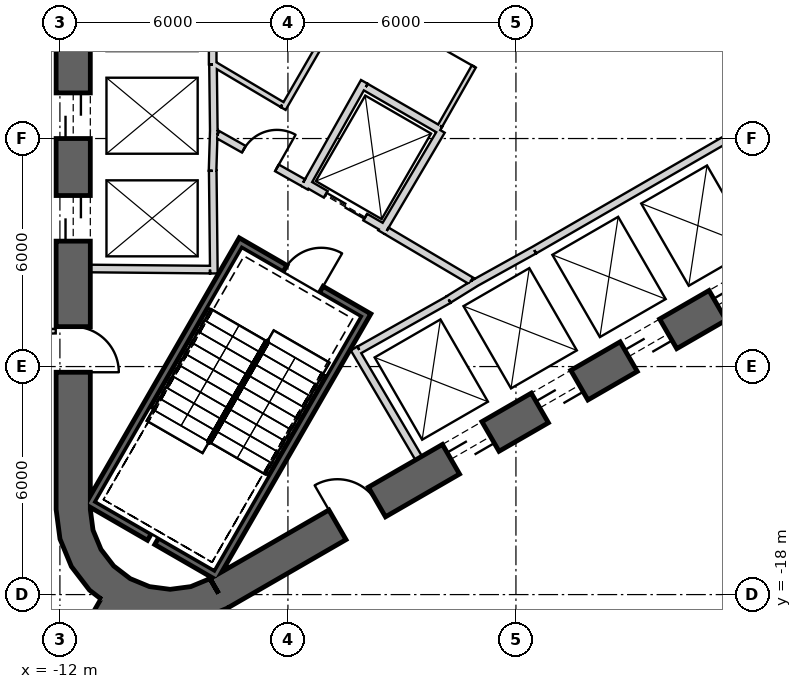
"""IFC4 building model, lengths in metres.
Left out: names, types, materials, properties, quantities, classifications, styles, units other than length and angle.
Written with IfcOpenShell. Run it as: python <this file> out.ifc"""

import sys

from ifc_helpers import new_model, si_unit, direction, frame, frame_2d, origin, place, context, subcontext, project, spatial, polyline, rectangle, outline, extrude, element, fill, save


model = new_model("IFC4")
c1 = context("Model", 3, precision=1e-05, world=origin(), true_north=direction((0.0, 1.0)))
c2 = subcontext(c1, "Body", "Model", "MODEL_VIEW")
j1 = project(units=[si_unit("LENGTHUNIT", "METRE"), si_unit("PLANEANGLEUNIT", "RADIAN")], contexts=[c1])
p1 = place(None, origin())
s1 = spatial("IfcSite", under=j1, at=p1, CompositionType="ELEMENT")
p2 = place(p1, origin())
s2 = spatial("IfcBuilding", under=s1, at=p2, CompositionType="ELEMENT")
p3 = place(p2, frame((0.0, 0.0, 156.2)))
s3 = spatial("IfcBuildingStorey", under=s2, at=p3, CompositionType="ELEMENT", Elevation=156.2)
p4 = place(p3, frame((-11.65, 15.762, 0.0), z_axis=(0.0, 0.0, 1.0), x_axis=(0.0, -1.0, 0.0)))
e1 = element("IfcWall", 1, at=p4, inside=s3, PredefinedType="SHEAR", context=c2, shape_type="SweptSolid", body=[
    extrude(rectangle(XDim=31.523, YDim=0.9, at=frame_2d((15.762, 0.0))), origin(), (0.0, 0.0, 1.0), 7.0),
])
p5 = place(p4, frame((7.062, 0.0, 0.0)))
e2 = element("IfcOpeningElement", 2, at=p5, cuts=e1, PredefinedType="OPENING", context=c2, shape_type="SweptSolid", body=[
    extrude(rectangle(XDim=1.2, YDim=2.4, at=frame_2d((0.6, 1.2))), frame((0.0, 0.46, 0.0), z_axis=(0.0, -1.0, 0.0), x_axis=(1.0, 0.0, 0.0)), (0.0, 0.0, 1.0), 0.92),
])
p6 = place(p4, frame((9.762, 0.0, 0.0)))
e3 = element("IfcOpeningElement", 3, at=p6, cuts=e1, PredefinedType="OPENING", context=c2, shape_type="SweptSolid", body=[
    extrude(rectangle(XDim=1.2, YDim=2.4, at=frame_2d((0.6, 1.2))), frame((0.0, 0.46, 0.0), z_axis=(0.0, -1.0, 0.0), x_axis=(1.0, 0.0, 0.0)), (0.0, 0.0, 1.0), 0.92),
])
p7 = place(p4, frame((12.462, 0.0, 0.0)))
e4 = element("IfcOpeningElement", 4, at=p7, cuts=e1, PredefinedType="OPENING", context=c2, shape_type="SweptSolid", body=[
    extrude(rectangle(XDim=1.2, YDim=2.4, at=frame_2d((0.6, 1.2))), frame((0.0, 0.46, 0.0), z_axis=(0.0, -1.0, 0.0), x_axis=(1.0, 0.0, 0.0)), (0.0, 0.0, 1.0), 0.92),
])
p8 = place(p4, frame((15.162, 0.0, 0.0)))
e5 = element("IfcOpeningElement", 5, at=p8, cuts=e1, PredefinedType="OPENING", context=c2, shape_type="SweptSolid", body=[
    extrude(rectangle(XDim=1.2, YDim=2.4, at=frame_2d((0.6, 1.2))), frame((0.0, 0.46, 0.0), z_axis=(0.0, -1.0, 0.0), x_axis=(1.0, 0.0, 0.0)), (0.0, 0.0, 1.0), 0.92),
])
p9 = place(p4, frame((17.862, 0.0, 0.0)))
e6 = element("IfcOpeningElement", 6, at=p9, cuts=e1, PredefinedType="OPENING", context=c2, shape_type="SweptSolid", body=[
    extrude(rectangle(XDim=1.2, YDim=2.4, at=frame_2d((0.6, 1.2))), frame((0.0, 0.46, 0.0), z_axis=(0.0, -1.0, 0.0), x_axis=(1.0, 0.0, 0.0)), (0.0, 0.0, 1.0), 0.92),
])
p10 = place(p4, frame((20.562, 0.0, 0.0)))
e7 = element("IfcOpeningElement", 7, at=p10, cuts=e1, PredefinedType="OPENING", context=c2, shape_type="SweptSolid", body=[
    extrude(rectangle(XDim=1.2, YDim=2.4, at=frame_2d((0.6, 1.2))), frame((0.0, 0.46, 0.0), z_axis=(0.0, -1.0, 0.0), x_axis=(1.0, 0.0, 0.0)), (0.0, 0.0, 1.0), 0.92),
])
p11 = place(p4, frame((23.262, 0.0, 0.0)))
e8 = element("IfcOpeningElement", 8, at=p11, cuts=e1, PredefinedType="OPENING", context=c2, shape_type="SweptSolid", body=[
    extrude(rectangle(XDim=1.2, YDim=2.4, at=frame_2d((0.6, 1.2))), frame((0.0, 0.46, 0.0), z_axis=(0.0, -1.0, 0.0), x_axis=(1.0, 0.0, 0.0)), (0.0, 0.0, 1.0), 0.92),
])
p12 = place(p4, frame((3.612, 0.0, 0.0)))
e9 = element("IfcOpeningElement", 9, at=p12, cuts=e1, PredefinedType="OPENING", context=c2, shape_type="SweptSolid", body=[
    extrude(rectangle(XDim=1.2, YDim=2.4, at=frame_2d((0.6, 1.2))), frame((0.0, 0.46, 0.0), z_axis=(0.0, -1.0, 0.0), x_axis=(1.0, 0.0, 0.0)), (0.0, 0.0, 1.0), 0.92),
])
p13 = place(p4, frame((26.712, 0.0, 0.0)))
e10 = element("IfcOpeningElement", 10, at=p13, cuts=e1, PredefinedType="OPENING", context=c2, shape_type="SweptSolid", body=[
    extrude(rectangle(XDim=1.2, YDim=2.4, at=frame_2d((0.6, 1.2))), frame((0.0, 0.46, 0.0), z_axis=(0.0, -1.0, 0.0), x_axis=(1.0, 0.0, 0.0)), (0.0, 0.0, 1.0), 0.92),
])
p14 = place(p3, frame((-7.825, -17.97, 0.0), z_axis=(0.0, 0.0, 1.0), x_axis=(0.866028369851, 0.499994862586, 0.0)))
e11 = element("IfcWall", 11, at=p14, inside=s3, PredefinedType="SHEAR", context=c2, shape_type="SweptSolid", body=[
    extrude(rectangle(XDim=31.523, YDim=0.9, at=frame_2d((15.762, 0.0))), origin(), (0.0, 0.0, 1.0), 7.0),
])
p15 = place(p14, frame((7.062, 0.0, 0.0)))
e12 = element("IfcOpeningElement", 12, at=p15, cuts=e11, PredefinedType="OPENING", context=c2, shape_type="SweptSolid", body=[
    extrude(rectangle(XDim=1.2, YDim=2.4, at=frame_2d((0.6, 1.2))), frame((0.0, 0.46, 0.0), z_axis=(0.0, -1.0, 0.0), x_axis=(1.0, 0.0, 0.0)), (0.0, 0.0, 1.0), 0.92),
])
p16 = place(p14, frame((9.762, 0.0, 0.0)))
e13 = element("IfcOpeningElement", 13, at=p16, cuts=e11, PredefinedType="OPENING", context=c2, shape_type="SweptSolid", body=[
    extrude(rectangle(XDim=1.2, YDim=2.4, at=frame_2d((0.6, 1.2))), frame((0.0, 0.46, 0.0), z_axis=(0.0, -1.0, 0.0), x_axis=(1.0, 0.0, 0.0)), (0.0, 0.0, 1.0), 0.92),
])
p17 = place(p14, frame((12.462, 0.0, 0.0)))
e14 = element("IfcOpeningElement", 14, at=p17, cuts=e11, PredefinedType="OPENING", context=c2, shape_type="SweptSolid", body=[
    extrude(rectangle(XDim=1.2, YDim=2.4, at=frame_2d((0.6, 1.2))), frame((0.0, 0.46, 0.0), z_axis=(0.0, -1.0, 0.0), x_axis=(1.0, 0.0, 0.0)), (0.0, 0.0, 1.0), 0.92),
])
p18 = place(p14, frame((15.162, 0.0, 0.0)))
e15 = element("IfcOpeningElement", 15, at=p18, cuts=e11, PredefinedType="OPENING", context=c2, shape_type="SweptSolid", body=[
    extrude(rectangle(XDim=1.2, YDim=2.4, at=frame_2d((0.6, 1.2))), frame((0.0, 0.46, 0.0), z_axis=(0.0, -1.0, 0.0), x_axis=(1.0, 0.0, 0.0)), (0.0, 0.0, 1.0), 0.92),
])
p19 = place(p14, frame((17.862, 0.0, 0.0)))
e16 = element("IfcOpeningElement", 16, at=p19, cuts=e11, PredefinedType="OPENING", context=c2, shape_type="SweptSolid", body=[
    extrude(rectangle(XDim=1.2, YDim=2.4, at=frame_2d((0.6, 1.2))), frame((0.0, 0.46, 0.0), z_axis=(0.0, -1.0, 0.0), x_axis=(1.0, 0.0, 0.0)), (0.0, 0.0, 1.0), 0.92),
])
p20 = place(p14, frame((20.562, 0.0, 0.0)))
e17 = element("IfcOpeningElement", 17, at=p20, cuts=e11, PredefinedType="OPENING", context=c2, shape_type="SweptSolid", body=[
    extrude(rectangle(XDim=1.2, YDim=2.4, at=frame_2d((0.6, 1.2))), frame((0.0, 0.46, 0.0), z_axis=(0.0, -1.0, 0.0), x_axis=(1.0, 0.0, 0.0)), (0.0, 0.0, 1.0), 0.92),
])
p21 = place(p14, frame((26.712, 0.0, 0.0)))
e18 = element("IfcOpeningElement", 18, at=p21, cuts=e11, PredefinedType="OPENING", context=c2, shape_type="SweptSolid", body=[
    extrude(rectangle(XDim=1.2, YDim=2.4, at=frame_2d((0.6, 1.2))), frame((0.0, 0.46, 0.0), z_axis=(0.0, -1.0, 0.0), x_axis=(1.0, 0.0, 0.0)), (0.0, 0.0, 1.0), 0.92),
])
p22 = place(p14, frame((3.612, 0.0, 0.0)))
e19 = element("IfcOpeningElement", 19, at=p22, cuts=e11, PredefinedType="OPENING", context=c2, shape_type="SweptSolid", body=[
    extrude(rectangle(XDim=1.2, YDim=2.4, at=frame_2d((0.6, 1.2))), frame((0.0, 0.46, 0.0), z_axis=(0.0, -1.0, 0.0), x_axis=(1.0, 0.0, 0.0)), (0.0, 0.0, 1.0), 0.92),
])
p23 = place(p3, origin())
e20 = element("IfcWall", 20, at=p23, inside=s3, PredefinedType="SHEAR", context=c2, shape_type="SweptSolid", body=[
    extrude(outline(polyline([(-12.1, -15.762), (-11.998, -16.538), (-11.698, -17.262), (-11.221, -17.883), (-10.6, -18.36), (-9.876, -18.659), (-9.1, -18.762), (-8.323, -18.659), (-7.6, -18.36), (-8.05, -17.58), (-8.556, -17.79), (-9.1, -17.862), (-9.644, -17.79), (-10.15, -17.58), (-10.585, -17.247), (-10.919, -16.812), (-11.128, -16.305), (-11.2, -15.762), (-12.1, -15.762)])), origin(), (0.0, 0.0, 1.0), 7.0),
])
p24 = place(p3, frame((-10.575, -18.316, 0.0), z_axis=(0.0, 0.0, 1.0), x_axis=(-0.500002326941, -0.86602406032, 0.0)))
e21 = element("IfcWall", 21, at=p24, inside=s3, PredefinedType="SHEAR", context=c2, shape_type="SweptSolid", body=[
    extrude(rectangle(XDim=12.384, YDim=0.8, at=frame_2d((6.192, 0.0))), origin(), (0.0, 0.0, 1.0), 7.0),
])
p25 = place(p24, frame((2.05, 0.0, 0.0)))
e22 = element("IfcOpeningElement", 22, at=p25, cuts=e21, PredefinedType="OPENING", context=c2, shape_type="SweptSolid", body=[
    extrude(rectangle(XDim=1.4, YDim=2.4, at=frame_2d((0.7, 1.2))), frame((0.0, 0.41, 0.0), z_axis=(0.0, -1.0, 0.0), x_axis=(1.0, 0.0, 0.0)), (0.0, 0.0, 1.0), 0.82),
])
p26 = place(p3, frame((-7.98, 4.05, 0.0), z_axis=(0.0, 0.0, 1.0), x_axis=(0.0, -1.0, 0.0)))
e23 = element("IfcWall", 23, at=p26, inside=s3, PredefinedType="PLUMBINGWALL", context=c2, shape_type="SweptSolid", body=[
    extrude(rectangle(XDim=8.1, YDim=0.2, at=frame_2d((4.05, 0.0))), origin(), (0.0, 0.0, 1.0), 6.65),
])
p27 = place(p3, frame((-7.95, -5.772, 0.0), z_axis=(0.0, 0.0, 1.0), x_axis=(-0.030803413295, -0.999525462272, 0.0)))
e24 = element("IfcWall", 24, at=p27, inside=s3, PredefinedType="PLUMBINGWALL", context=c2, shape_type="SweptSolid", body=[
    extrude(rectangle(XDim=1.078, YDim=0.2, at=frame_2d((0.539, 0.0))), origin(), (0.0, 0.0, 1.0), 6.65),
])
p28 = place(p3, frame((-7.971, -4.05, 0.0), z_axis=(0.0, 0.0, 1.0), x_axis=(0.012042535896, -0.999927486035, 0.0)))
e25 = element("IfcWall", 25, at=p28, inside=s3, PredefinedType="PLUMBINGWALL", context=c2, shape_type="SweptSolid", body=[
    extrude(rectangle(XDim=1.845, YDim=0.2, at=frame_2d((0.922, 0.0))), origin(), (0.0, 0.0, 1.0), 6.65),
])
p29 = place(p3, frame((-7.979, -6.85, 0.0), z_axis=(0.0, 0.0, 1.0), x_axis=(0.011121475088, -0.999938154483, 0.0)))
e26 = element("IfcWall", 26, at=p29, inside=s3, PredefinedType="PLUMBINGWALL", context=c2, shape_type="SweptSolid", body=[
    extrude(rectangle(XDim=2.7, YDim=0.2, at=frame_2d((1.35, 0.0))), origin(), (0.0, 0.0, 1.0), 6.65),
])
p30 = place(p3, frame((-8.05, -9.449, 0.0), z_axis=(0.0, 0.0, 1.0), x_axis=(-0.999957467379, 0.009222983926, 0.0)))
e27 = element("IfcWall", 27, at=p30, inside=s3, PredefinedType="PLUMBINGWALL", context=c2, shape_type="SweptSolid", body=[
    extrude(rectangle(XDim=3.15, YDim=0.2, at=frame_2d((1.575, 0.0))), origin(), (0.0, 0.0, 1.0), 6.65),
])
p31 = place(p3, frame((0.483, -8.936, 0.0), z_axis=(0.0, 0.0, 1.0), x_axis=(0.866030989016, 0.499990325971, 0.0)))
e28 = element("IfcWall", 28, at=p31, inside=s3, PredefinedType="PLUMBINGWALL", context=c2, shape_type="SweptSolid", body=[
    extrude(rectangle(XDim=8.1, YDim=0.2, at=frame_2d((4.05, 0.0))), origin(), (0.0, 0.0, 1.0), 6.65),
])
p32 = place(p3, frame((-2.558, -14.409, 0.0), z_axis=(0.0, 0.0, 1.0), x_axis=(-0.507997497166, 0.861358544901, 0.0)))
e29 = element("IfcWall", 29, at=p32, inside=s3, PredefinedType="PLUMBINGWALL", context=c2, shape_type="SweptSolid", body=[
    extrude(rectangle(XDim=3.35, YDim=0.2, at=frame_2d((1.675, 0.0))), origin(), (0.0, 0.0, 1.0), 6.65),
])
p33 = place(p3, frame((-1.769, -10.237, 0.0), z_axis=(0.0, 0.0, 1.0), x_axis=(-0.871534483978, -0.490334215854, 0.0)))
e30 = element("IfcWall", 30, at=p33, inside=s3, PredefinedType="PLUMBINGWALL", context=c2, shape_type="SweptSolid", body=[
    extrude(rectangle(XDim=2.7, YDim=0.2, at=frame_2d((1.35, 0.0))), origin(), (0.0, 0.0, 1.0), 6.65),
])
p34 = place(p3, frame((-1.024, -9.771, 0.0), z_axis=(0.0, 0.0, 1.0), x_axis=(-0.850348075135, -0.526220629693, 0.0)))
e31 = element("IfcWall", 31, at=p34, inside=s3, PredefinedType="PLUMBINGWALL", context=c2, shape_type="SweptSolid", body=[
    extrude(rectangle(XDim=0.878, YDim=0.2, at=frame_2d((0.439, 0.0))), origin(), (0.0, 0.0, 1.0), 6.65),
])
p35 = place(p3, frame((-1.13, -9.831, 0.0), z_axis=(0.0, 0.0, 1.0), x_axis=(0.874269620932, 0.485440655401, 0.0)))
e32 = element("IfcWall", 32, at=p35, inside=s3, PredefinedType="PLUMBINGWALL", context=c2, shape_type="SweptSolid", body=[
    extrude(rectangle(XDim=1.845, YDim=0.2, at=frame_2d((0.922, 0.0))), origin(), (0.0, 0.0, 1.0), 6.65),
])
p36 = place(p3, frame((-3.905, -10.563, -0.35), z_axis=(0.0, 0.0, 1.0), x_axis=(-0.500012932018, -0.866017937352, 0.0)))
e33 = element("IfcWall", 33, at=p36, inside=s3, PredefinedType="SHEAR", context=c2, shape_type="SweptSolid", body=[
    extrude(rectangle(XDim=8.1, YDim=0.2, at=frame_2d((4.05, 0.0))), origin(), (0.0, 0.0, 1.0), 7.0),
])
p37 = place(p3, frame((-11.282, -15.541, -0.35), z_axis=(0.0, 0.0, 1.0), x_axis=(0.866000578957, -0.500042995397, 0.0)))
e34 = element("IfcWall", 34, at=p37, inside=s3, PredefinedType="SHEAR", context=c2, shape_type="SweptSolid", body=[
    extrude(rectangle(XDim=1.89, YDim=0.2, at=frame_2d((0.945, 0.0))), origin(), (0.0, 0.0, 1.0), 7.0),
])
p38 = place(p3, frame((-9.455, -16.596, -0.35), z_axis=(0.0, 0.0, 1.0), x_axis=(0.866038843867, -0.499976720371, 0.0)))
e35 = element("IfcWall", 35, at=p38, inside=s3, PredefinedType="SHEAR", context=c2, shape_type="SweptSolid", body=[
    extrude(rectangle(XDim=1.69, YDim=0.2, at=frame_2d((0.845, 0.0))), origin(), (0.0, 0.0, 1.0), 7.0),
])
p39 = place(p3, frame((-7.196, -8.663, -0.35), z_axis=(0.0, 0.0, 1.0), x_axis=(-0.499997992926, -0.866026562566, 0.0)))
e36 = element("IfcWall", 36, at=p39, inside=s3, PredefinedType="SHEAR", context=c2, shape_type="SweptSolid", body=[
    extrude(rectangle(XDim=7.9, YDim=0.2, at=frame_2d((3.95, 0.0))), origin(), (0.0, 0.0, 1.0), 7.0),
])
p40 = place(p3, frame((-4.041, -10.599, -0.35), z_axis=(0.0, 0.0, 1.0), x_axis=(-0.866047807691, 0.499961193289, 0.0)))
e37 = element("IfcWall", 37, at=p40, inside=s3, PredefinedType="SHEAR", context=c2, shape_type="SweptSolid", body=[
    extrude(rectangle(XDim=3.6, YDim=0.2, at=frame_2d((1.8, 0.0))), origin(), (0.0, 0.0, 1.0), 7.0),
])
p41 = place(p40, frame((1.25, 0.0, 0.35)))
e38 = element("IfcOpeningElement", 38, at=p41, cuts=e37, PredefinedType="OPENING", context=c2, shape_type="SweptSolid", body=[
    extrude(rectangle(XDim=1.1, YDim=2.1, at=frame_2d((0.55, 1.05))), frame((0.0, 0.11, 0.0), z_axis=(0.0, -1.0, 0.0), x_axis=(1.0, 0.0, 0.0)), (0.0, 0.0, 1.0), 0.22),
])
p42 = place(p3, frame((-3.446, -8.368, 0.0), z_axis=(0.0, 0.0, 1.0), x_axis=(-0.866024647952, 0.500001309137, 0.0)))
e39 = element("IfcWall", 39, at=p42, inside=s3, PredefinedType="PLUMBINGWALL", context=c2, shape_type="SweptSolid", body=[
    extrude(rectangle(XDim=2.4, YDim=0.2, at=frame_2d((1.2, 0.0))), origin(), (0.0, 0.0, 1.0), 6.65),
])
p43 = place(p42, frame((0.6, 0.0, 0.0)))
e40 = element("IfcOpeningElement", 40, at=p43, cuts=e39, PredefinedType="OPENING", context=c2, shape_type="SweptSolid", body=[
    extrude(rectangle(XDim=1.2, YDim=2.4, at=frame_2d((0.6, 1.2))), frame((0.0, 0.11, 0.0), z_axis=(0.0, -1.0, 0.0), x_axis=(1.0, 0.0, 0.0)), (0.0, 0.0, 1.0), 0.22),
])
p44 = place(p3, frame((-1.961, -5.796, 0.0), z_axis=(0.0, 0.0, 1.0), x_axis=(-0.508647062354, -0.860975125052, 0.0)))
e41 = element("IfcWall", 41, at=p44, inside=s3, PredefinedType="PLUMBINGWALL", context=c2, shape_type="SweptSolid", body=[
    extrude(rectangle(XDim=3.1, YDim=0.2, at=frame_2d((1.55, 0.0))), origin(), (0.0, 0.0, 1.0), 6.65),
])
p45 = place(p3, frame((-3.99, -4.509, 0.0), z_axis=(0.0, 0.0, 1.0), x_axis=(-0.491358283181, -0.870957540612, 0.0)))
e42 = element("IfcWall", 42, at=p45, inside=s3, PredefinedType="PLUMBINGWALL", context=c2, shape_type="SweptSolid", body=[
    extrude(rectangle(XDim=3.2, YDim=0.2, at=frame_2d((1.6, 0.0))), origin(), (0.0, 0.0, 1.0), 6.65),
])
p46 = place(p3, frame((-3.953, -4.646, 0.0), z_axis=(0.0, 0.0, 1.0), x_axis=(0.866065302921, -0.4999308863, 0.0)))
e43 = element("IfcWall", 43, at=p46, inside=s3, PredefinedType="PLUMBINGWALL", context=c2, shape_type="SweptSolid", body=[
    extrude(rectangle(XDim=2.264, YDim=0.2, at=frame_2d((1.132, 0.0))), origin(), (0.0, 0.0, 1.0), 6.65),
])
p47 = place(p3, frame((-3.401, -8.43, 0.0), z_axis=(0.0, 0.0, 1.0), x_axis=(0.860615607571, -0.509255118781, 0.0)))
e44 = element("IfcWall", 44, at=p47, inside=s3, PredefinedType="PARTITIONING", context=c2, shape_type="SweptSolid", body=[
    extrude(rectangle(XDim=2.581, YDim=0.2, at=frame_2d((1.29, 0.0))), origin(), (0.0, 0.0, 1.0), 6.65),
])
p48 = place(p3, frame((-7.849, -5.894, 0.0), z_axis=(0.0, 0.0, 1.0), x_axis=(0.871363259478, -0.490638431059, 0.0)))
e45 = element("IfcWall", 45, at=p48, inside=s3, PredefinedType="PARTITIONING", context=c2, shape_type="SweptSolid", body=[
    extrude(rectangle(XDim=2.581, YDim=0.2, at=frame_2d((1.291, 0.0))), origin(), (0.0, 0.0, 1.0), 6.65),
])
p49 = place(p48, frame((0.791, 0.0, 0.0)))
e46 = element("IfcOpeningElement", 46, at=p49, cuts=e45, PredefinedType="OPENING", context=c2, shape_type="SweptSolid", body=[
    extrude(rectangle(XDim=1.0, YDim=2.1, at=frame_2d((0.5, 1.05))), frame((0.0, 0.11, 0.0), z_axis=(0.0, -1.0, 0.0), x_axis=(1.0, 0.0, 0.0)), (0.0, 0.0, 1.0), 0.22),
])
p50 = place(p3, frame((0.224, -1.761, 0.0), z_axis=(0.0, 0.0, 1.0), x_axis=(-0.494327216836, -0.869275907118, 0.0)))
e47 = element("IfcWall", 47, at=p50, inside=s3, PredefinedType="PARTITIONING", context=c2, shape_type="SweptSolid", body=[
    extrude(rectangle(XDim=4.487, YDim=0.12, at=frame_2d((2.244, 0.0))), origin(), (0.0, 0.0, 1.0), 6.65),
])
p51 = place(p50, frame((1.895, 0.0, 0.0)))
e48 = element("IfcOpeningElement", 48, at=p51, cuts=e47, PredefinedType="OPENING", context=c2, shape_type="SweptSolid", body=[
    extrude(rectangle(XDim=0.8, YDim=2.1, at=frame_2d((0.4, 1.05))), frame((0.0, 0.07, 0.0), z_axis=(0.0, -1.0, 0.0), x_axis=(1.0, 0.0, 0.0)), (0.0, 0.0, 1.0), 0.14),
])
p52 = place(p3, frame((-6.126, -5.21, 0.0), z_axis=(0.0, 0.0, 1.0), x_axis=(0.499990139034, 0.866031096941, 0.0)))
e49 = element("IfcWall", 49, at=p52, inside=s3, PredefinedType="PLUMBINGWALL", context=c2, shape_type="SweptSolid", body=[
    extrude(rectangle(XDim=3.0, YDim=0.15, at=frame_2d((1.5, 0.0))), origin(), (0.0, 0.0, 1.0), 6.65),
])
p53 = place(p3, frame((-7.95, -4.041, 0.0), z_axis=(0.0, 0.0, 1.0), x_axis=(0.860090281069, -0.510141851263, 0.0)))
e50 = element("IfcWall", 50, at=p53, inside=s3, PredefinedType="PLUMBINGWALL", context=c2, shape_type="SweptSolid", body=[
    extrude(rectangle(XDim=2.089, YDim=0.15, at=frame_2d((1.045, 0.0))), origin(), (0.0, 0.0, 1.0), 6.65),
])
p54 = place(p3, frame((-18.156, -11.254, 0.0), z_axis=(0.0, 0.0, 1.0), x_axis=(0.999523488274, 0.030867400097, 0.0)))
e51 = element("IfcWall", 51, at=p54, inside=s3, PredefinedType="PARTITIONING", context=c2, shape_type="SweptSolid", body=[
    extrude(rectangle(XDim=6.059, YDim=0.12, at=frame_2d((3.029, 0.0))), origin(), (0.0, 0.0, 1.0), 5.93),
])
p55 = place(p54, frame((2.63, 0.0, 0.0)))
e52 = element("IfcOpeningElement", 52, at=p55, cuts=e51, PredefinedType="OPENING", context=c2, shape_type="SweptSolid", body=[
    extrude(rectangle(XDim=0.9, YDim=2.1, at=frame_2d((0.45, 1.05))), frame((0.0, 0.07, 0.0), z_axis=(0.0, -1.0, 0.0), x_axis=(1.0, 0.0, 0.0)), (0.0, 0.0, 1.0), 0.14),
])
p56 = place(p41, origin())
e53 = element("IfcDoor", 53, at=p56, inside=s3, OperationType="SINGLE_SWING_LEFT", PredefinedType="USERDEFINED", context=c2, shape_type="SweptSolid", body=[
    extrude(rectangle(XDim=1.1, YDim=2.1, at=frame_2d((0.55, 1.05))), frame((0.0, 0.025, 0.0), z_axis=(0.0, -1.0, 0.0), x_axis=(1.0, 0.0, 0.0)), (0.0, 0.0, 1.0), 0.05),
])
fill(e38, e53)
p57 = place(p49, origin())
e54 = element("IfcDoor", 54, at=p57, inside=s3, OperationType="SINGLE_SWING_RIGHT", PredefinedType="USERDEFINED", context=c2, shape_type="SweptSolid", body=[
    extrude(rectangle(XDim=1.0, YDim=2.1, at=frame_2d((0.5, 1.05))), frame((0.0, 0.025, 0.0), z_axis=(0.0, -1.0, 0.0), x_axis=(1.0, 0.0, 0.0)), (0.0, 0.0, 1.0), 0.05),
])
fill(e46, e54)
p58 = place(p43, origin())
e55 = element("IfcDoor", 55, at=p58, inside=s3, OperationType="SLIDING_TO_LEFT", PredefinedType="USERDEFINED", context=c2, shape_type="SweptSolid", body=[
    extrude(rectangle(XDim=1.2, YDim=2.4, at=frame_2d((0.6, 1.2))), frame((0.0, 0.025, 0.0), z_axis=(0.0, -1.0, 0.0), x_axis=(1.0, 0.0, 0.0)), (0.0, 0.0, 1.0), 0.05),
])
fill(e40, e55)
p59 = place(p51, origin())
e56 = element("IfcDoor", 56, at=p59, inside=s3, OperationType="SINGLE_SWING_RIGHT", PredefinedType="USERDEFINED", context=c2, shape_type="SweptSolid", body=[
    extrude(rectangle(XDim=0.8, YDim=2.1, at=frame_2d((0.4, 1.05))), frame((0.0, 0.025, 0.0), z_axis=(0.0, -1.0, 0.0), x_axis=(1.0, 0.0, 0.0)), (0.0, 0.0, 1.0), 0.05),
])
fill(e48, e56)
p60 = place(p10, origin())
e57 = element("IfcDoor", 57, at=p60, inside=s3, OperationType="SLIDING_TO_LEFT", PredefinedType="USERDEFINED", context=c2, shape_type="SweptSolid", body=[
    extrude(rectangle(XDim=1.2, YDim=2.4, at=frame_2d((0.6, 1.2))), frame((0.0, 0.025, 0.0), z_axis=(0.0, -1.0, 0.0), x_axis=(1.0, 0.0, 0.0)), (0.0, 0.0, 1.0), 0.05),
])
fill(e7, e57)
p61 = place(p11, origin())
e58 = element("IfcDoor", 58, at=p61, inside=s3, OperationType="SLIDING_TO_LEFT", PredefinedType="USERDEFINED", context=c2, shape_type="SweptSolid", body=[
    extrude(rectangle(XDim=1.2, YDim=2.4, at=frame_2d((0.6, 1.2))), frame((0.0, 0.025, 0.0), z_axis=(0.0, -1.0, 0.0), x_axis=(1.0, 0.0, 0.0)), (0.0, 0.0, 1.0), 0.05),
])
fill(e8, e58)
p62 = place(p15, origin())
e59 = element("IfcDoor", 59, at=p62, inside=s3, OperationType="SLIDING_TO_LEFT", PredefinedType="USERDEFINED", context=c2, shape_type="SweptSolid", body=[
    extrude(rectangle(XDim=1.2, YDim=2.4, at=frame_2d((0.6, 1.2))), frame((0.0, 0.025, 0.0), z_axis=(0.0, -1.0, 0.0), x_axis=(1.0, 0.0, 0.0)), (0.0, 0.0, 1.0), 0.05),
])
fill(e12, e59)
p63 = place(p16, origin())
e60 = element("IfcDoor", 60, at=p63, inside=s3, OperationType="SLIDING_TO_LEFT", PredefinedType="USERDEFINED", context=c2, shape_type="SweptSolid", body=[
    extrude(rectangle(XDim=1.2, YDim=2.4, at=frame_2d((0.6, 1.2))), frame((0.0, 0.025, 0.0), z_axis=(0.0, -1.0, 0.0), x_axis=(1.0, 0.0, 0.0)), (0.0, 0.0, 1.0), 0.05),
])
fill(e13, e60)
p64 = place(p17, origin())
e61 = element("IfcDoor", 61, at=p64, inside=s3, OperationType="SLIDING_TO_LEFT", PredefinedType="USERDEFINED", context=c2, shape_type="SweptSolid", body=[
    extrude(rectangle(XDim=1.2, YDim=2.4, at=frame_2d((0.6, 1.2))), frame((0.0, 0.025, 0.0), z_axis=(0.0, -1.0, 0.0), x_axis=(1.0, 0.0, 0.0)), (0.0, 0.0, 1.0), 0.05),
])
fill(e14, e61)
p65 = place(p18, origin())
e62 = element("IfcDoor", 62, at=p65, inside=s3, OperationType="SLIDING_TO_LEFT", PredefinedType="USERDEFINED", context=c2, shape_type="SweptSolid", body=[
    extrude(rectangle(XDim=1.2, YDim=2.4, at=frame_2d((0.6, 1.2))), frame((0.0, 0.025, 0.0), z_axis=(0.0, -1.0, 0.0), x_axis=(1.0, 0.0, 0.0)), (0.0, 0.0, 1.0), 0.05),
])
fill(e15, e62)
p66 = place(p13, origin())
e63 = element("IfcDoor", 63, at=p66, inside=s3, OperationType="SINGLE_SWING_RIGHT", PredefinedType="USERDEFINED", context=c2, shape_type="SweptSolid", body=[
    extrude(rectangle(XDim=1.2, YDim=2.4, at=frame_2d((0.6, 1.2))), frame((0.0, 0.025, 0.0), z_axis=(0.0, -1.0, 0.0), x_axis=(1.0, 0.0, 0.0)), (0.0, 0.0, 1.0), 0.05),
])
fill(e10, e63)
p67 = place(p22, origin())
e64 = element("IfcDoor", 64, at=p67, inside=s3, OperationType="SINGLE_SWING_LEFT", PredefinedType="USERDEFINED", context=c2, shape_type="SweptSolid", body=[
    extrude(rectangle(XDim=1.2, YDim=2.4, at=frame_2d((0.6, 1.2))), frame((0.0, 0.025, 0.0), z_axis=(0.0, -1.0, 0.0), x_axis=(1.0, 0.0, 0.0)), (0.0, 0.0, 1.0), 0.05),
])
fill(e19, e64)
save(model, sys.argv[1])
